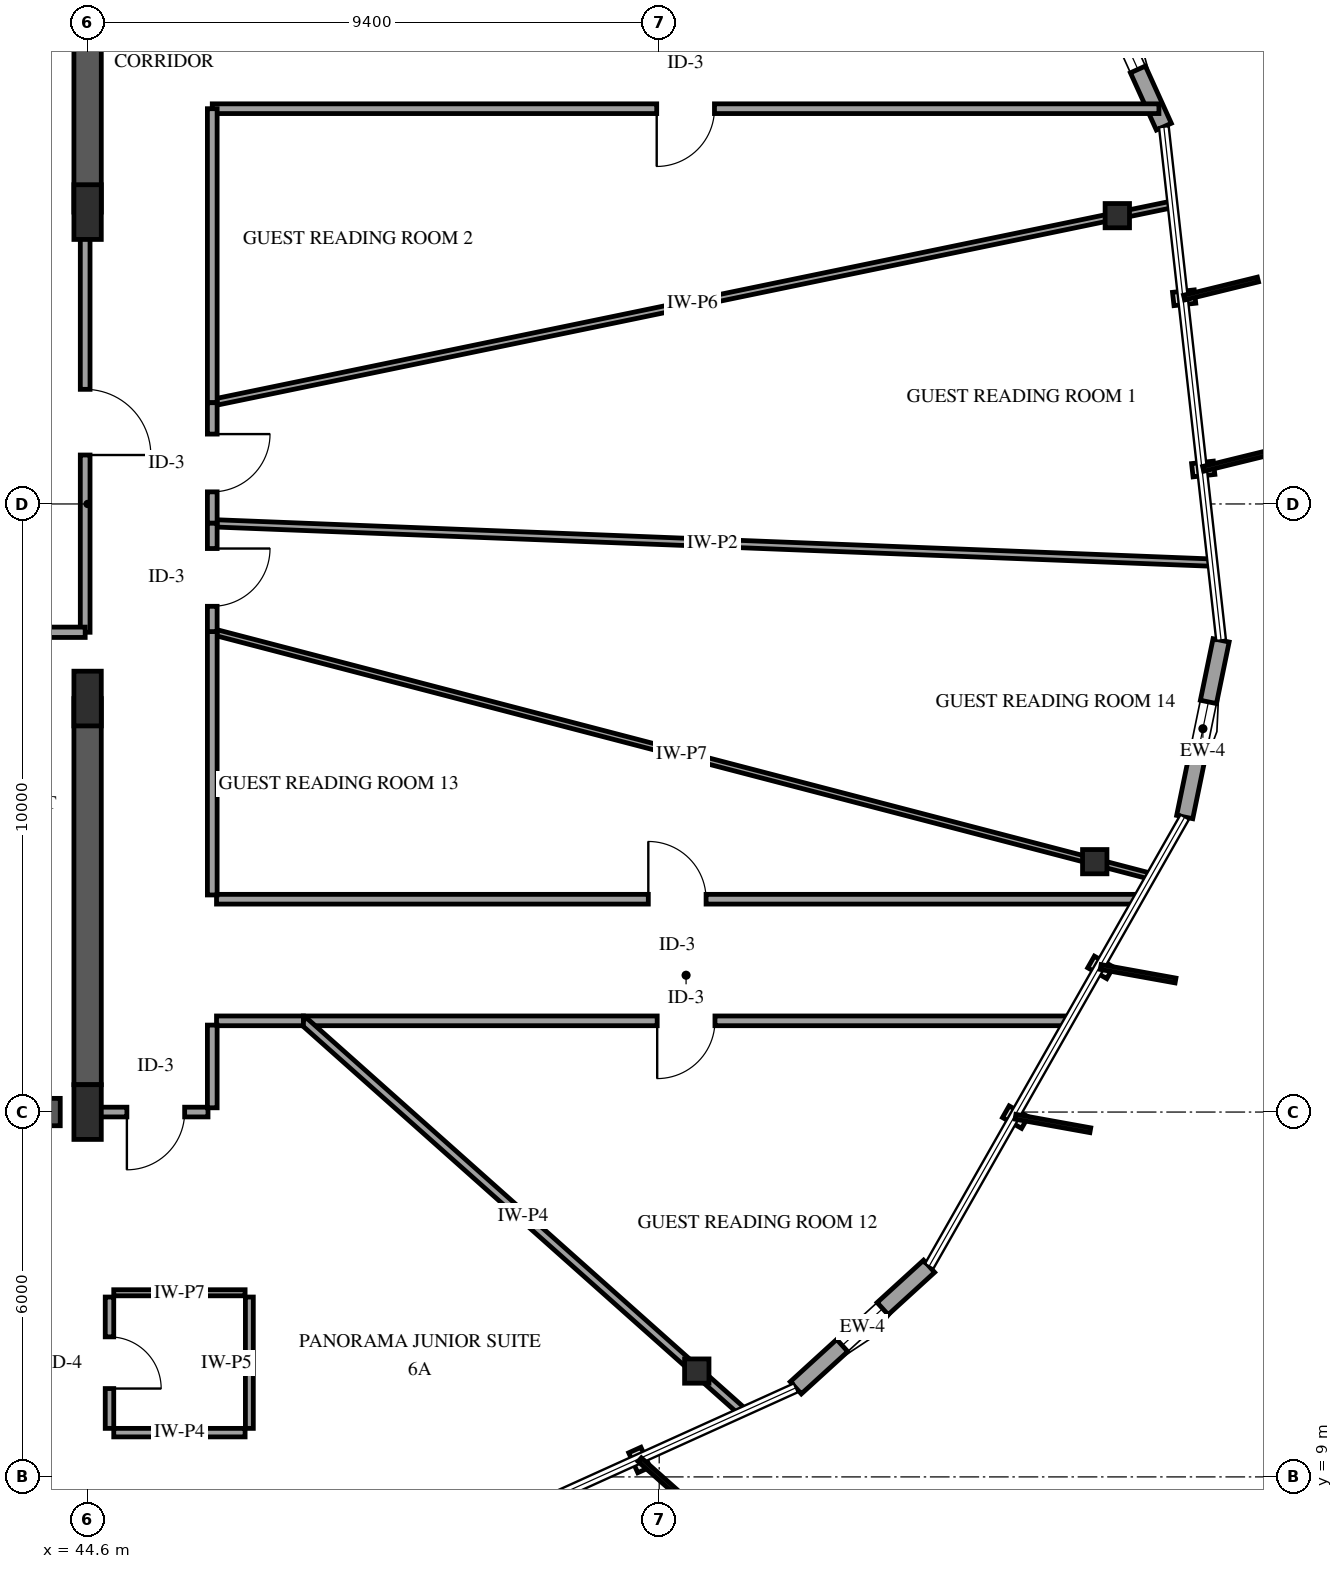
"""IFC4 building model, lengths in metres.
Left out: names, types, materials, properties, quantities, classifications, styles, units other than length and angle.
Written with IfcOpenShell. Run it as: python <this file> out.ifc"""

import sys

from ifc_helpers import new_model, si_unit, direction, frame, frame_2d, origin, origin_2d, place, context, subcontext, project, spatial, rectangle, i_section, extrude, element, fill, save


model = new_model("IFC4")
c1 = context("Model", 3, precision=1e-05, world=origin(), true_north=direction((0.0, 1.0)))
c2 = subcontext(c1, "Body", "Model", "MODEL_VIEW")
j1 = project(units=[si_unit("LENGTHUNIT", "METRE"), si_unit("PLANEANGLEUNIT", "RADIAN")], contexts=[c1])
p1 = place(None, origin())
s1 = spatial("IfcSite", under=j1, at=p1, CompositionType="ELEMENT")
p2 = place(p1, origin())
s2 = spatial("IfcBuilding", under=s1, at=p2, CompositionType="ELEMENT")
p3 = place(p2, frame((0.0, 0.0, 257.5)))
s3 = spatial("IfcBuildingStorey", under=s2, at=p3, CompositionType="ELEMENT", Elevation=257.5)
p4 = place(p3, frame((41.3, 15.0, 0.0), z_axis=(0.0, 0.0, 1.0), x_axis=(1.0, 0.0, 0.0)))
e1 = element("IfcWall", 1, at=p4, inside=s3, PredefinedType="SHEAR", context=c2, shape_type="SweptSolid", body=[
    extrude(rectangle(XDim=2.85, YDim=0.45, at=frame_2d((1.425, 0.0))), origin(), (0.0, 0.0, 1.0), 3.75),
])
p5 = place(p3, frame((44.6, 15.45, 0.0), z_axis=(0.0, 0.0, 1.0), x_axis=(0.0, 1.0, 0.0)))
e2 = element("IfcWall", 2, at=p5, inside=s3, PredefinedType="SHEAR", context=c2, shape_type="SweptSolid", body=[
    extrude(rectangle(XDim=6.35, YDim=0.45, at=frame_2d((3.175, 0.0))), origin(), (0.0, 0.0, 1.0), 3.75),
])
p6 = place(p3, frame((44.6, 29.8, 0.0), z_axis=(0.0, 0.0, 1.0), x_axis=(0.0, 1.0, 0.0)))
e3 = element("IfcWall", 3, at=p6, inside=s3, PredefinedType="SHEAR", context=c2, shape_type="SweptSolid", body=[
    extrude(rectangle(XDim=4.75, YDim=0.45, at=frame_2d((2.375, 0.0))), origin(), (0.0, 0.0, 1.0), 3.75),
])
for number, where, z_axis, x_axis in (
    (4, (44.6, 15.0, 0.0), (0.0, 0.0, 1.0), (1.0, 0.0, 0.0)),
    (5, (44.6, 21.8, 0.0), (0.0, 0.0, 1.0), (1.0, 0.0, 0.0)),
    (6, (44.6, 29.8, 0.0), (0.0, 0.0, 1.0), (1.0, 0.0, 0.0)),
):
    element("IfcColumn", number, at=place(p3, frame(where, z_axis=z_axis, x_axis=x_axis)), inside=s3, PredefinedType="PILASTER", context=c2, shape_type="SweptSolid", body=[
        extrude(rectangle(XDim=0.45, YDim=0.9, at=origin_2d()), origin(), (0.0, 0.0, 1.0), 3.75),
    ])
for number, where, z_axis, x_axis in (
    (7, (61.534, 29.741, 0.0), (0.0, 0.0, 1.0), (1.0, 0.0, 0.0)),
    (8, (54.618, 10.74, 0.0), (0.0, 0.0, 1.0), (1.0, 0.0, 0.0)),
    (9, (61.163, 19.117, 0.0), (0.0, 0.0, 1.0), (1.0, 0.0, 0.0)),
):
    element("IfcColumn", number, at=place(p3, frame(where, z_axis=z_axis, x_axis=x_axis)), inside=s3, PredefinedType="COLUMN", context=c2, shape_type="SweptSolid", body=[
        extrude(i_section(OverallWidth=0.401, OverallDepth=0.399, WebThickness=0.025, FlangeThickness=0.04, FilletRadius=0.038, at=origin_2d()), origin(), (0.0, 0.0, 1.0), 3.75),
    ])
p7 = place(p3, frame((56.246, 10.465, 0.0), z_axis=(0.0, 0.0, 1.0), x_axis=(0.73894499787, 0.673765753153, 0.0)))
e10 = element("IfcWall", 10, at=p7, inside=s3, PredefinedType="SOLIDWALL", context=c2, shape_type="SweptSolid", body=[
    extrude(rectangle(XDim=2.967, YDim=0.27, at=frame_2d((1.483, 0.0))), origin(), (0.0, 0.0, 1.0), 2.829),
])
p8 = place(p7, frame((1.033, 0.0, 0.75)))
e11 = element("IfcOpeningElement", 11, at=p8, cuts=e10, PredefinedType="OPENING", context=c2, shape_type="SweptSolid", body=[
    extrude(rectangle(XDim=0.9, YDim=1.5, at=frame_2d((0.45, 0.75))), frame((0.0, 0.145, 0.0), z_axis=(0.0, -1.0, 0.0), x_axis=(1.0, 0.0, 0.0)), (0.0, 0.0, 1.0), 0.29),
])
p9 = place(p3, frame((62.642, 19.851, 0.0), z_axis=(0.0, 0.0, 1.0), x_axis=(0.201715617992, 0.979444132893, 0.0)))
e12 = element("IfcWall", 12, at=p9, inside=s3, PredefinedType="SOLIDWALL", context=c2, shape_type="SweptSolid", body=[
    extrude(rectangle(XDim=2.967, YDim=0.27, at=frame_2d((1.483, 0.0))), origin(), (0.0, 0.0, 1.0), 2.829),
])
p10 = place(p9, frame((1.033, 0.0, 0.75)))
e13 = element("IfcOpeningElement", 13, at=p10, cuts=e12, PredefinedType="OPENING", context=c2, shape_type="SweptSolid", body=[
    extrude(rectangle(XDim=0.9, YDim=1.5, at=frame_2d((0.45, 0.75))), frame((0.0, 0.145, 0.0), z_axis=(0.0, -1.0, 0.0), x_axis=(1.0, 0.0, 0.0)), (0.0, 0.0, 1.0), 0.29),
])
p11 = place(p3, frame((62.299, 31.204, 0.0), z_axis=(0.0, 0.0, 1.0), x_axis=(-0.412481781571, 0.910965850003, 0.0)))
e14 = element("IfcWall", 14, at=p11, inside=s3, PredefinedType="SOLIDWALL", context=c2, shape_type="SweptSolid", body=[
    extrude(rectangle(XDim=2.967, YDim=0.27, at=frame_2d((1.483, 0.0))), origin(), (0.0, 0.0, 1.0), 2.829),
])
p12 = place(p11, frame((1.033, 0.0, 0.75)))
e15 = element("IfcOpeningElement", 15, at=p12, cuts=e14, PredefinedType="OPENING", context=c2, shape_type="SweptSolid", body=[
    extrude(rectangle(XDim=0.9, YDim=1.5, at=frame_2d((0.45, 0.75))), frame((0.0, 0.145, 0.0), z_axis=(0.0, -1.0, 0.0), x_axis=(1.0, 0.0, 0.0)), (0.0, 0.0, 1.0), 0.29),
])
p13 = place(p3, frame((63.098, 24.035, 0.0), z_axis=(0.0, 0.0, 1.0), x_axis=(-0.999224382553, 0.039378081603, 0.0)))
e16 = element("IfcWall", 16, at=p13, inside=s3, PredefinedType="PARTITIONING", context=c2, shape_type="SweptSolid", body=[
    extrude(rectangle(XDim=16.461, YDim=0.12, at=frame_2d((8.23, 0.0))), origin(), (0.0, 0.0, 1.0), 3.45),
])
p14 = place(p3, frame((46.65, 26.665, 0.0), z_axis=(0.0, 0.0, 1.0), x_axis=(0.979311663395, 0.202357767181, 0.0)))
e17 = element("IfcWall", 17, at=p14, inside=s3, PredefinedType="PARTITIONING", context=c2, shape_type="SweptSolid", body=[
    extrude(rectangle(XDim=16.125, YDim=0.11, at=frame_2d((8.062, 0.0))), origin(), (0.0, 0.0, 1.0), 2.745),
])
p15 = place(p3, frame((46.65, 22.901, 0.0), z_axis=(0.0, 0.0, 1.0), x_axis=(0.967650092585, -0.252296052923, 0.0)))
e18 = element("IfcWall", 18, at=p15, inside=s3, PredefinedType="PARTITIONING", context=c2, shape_type="SweptSolid", body=[
    extrude(rectangle(XDim=15.953, YDim=0.1, at=frame_2d((7.977, 0.0))), origin(), (0.0, 0.0, 1.0), 3.45),
])
p16 = place(p3, frame((62.218, 31.5, 0.0), z_axis=(0.0, 0.0, 1.0), x_axis=(-1.0, 0.0, 0.0)))
e19 = element("IfcWall", 19, at=p16, inside=s3, PredefinedType="PARTITIONING", context=c2, shape_type="SweptSolid", body=[
    extrude(rectangle(XDim=15.568, YDim=0.16, at=frame_2d((7.784, 0.0))), origin(), (0.0, 0.0, 1.0), 3.45),
])
p17 = place(p16, frame((7.309, 0.0, 0.0)))
e20 = element("IfcOpeningElement", 20, at=p17, cuts=e19, PredefinedType="OPENING", context=c2, shape_type="SweptSolid", body=[
    extrude(rectangle(XDim=0.95, YDim=2.15, at=frame_2d((0.475, 1.075))), frame((0.0, 0.09, 0.0), z_axis=(0.0, -1.0, 0.0), x_axis=(1.0, 0.0, 0.0)), (0.0, 0.0, 1.0), 0.18),
])
p18 = place(p3, frame((46.72, 18.5, 0.0), z_axis=(0.0, 0.0, 1.0), x_axis=(1.0, 0.0, 0.0)))
e21 = element("IfcWall", 21, at=p18, inside=s3, PredefinedType="PARTITIONING", context=c2, shape_type="SweptSolid", body=[
    extrude(rectangle(XDim=15.153, YDim=0.16, at=frame_2d((7.577, 0.0))), origin(), (0.0, 0.0, 1.0), 2.745),
])
p19 = place(p18, frame((7.101, 0.0, 0.0)))
e22 = element("IfcOpeningElement", 22, at=p19, cuts=e21, PredefinedType="OPENING", context=c2, shape_type="SweptSolid", body=[
    extrude(rectangle(XDim=0.95, YDim=2.15, at=frame_2d((0.475, 1.075))), frame((0.0, 0.09, 0.0), z_axis=(0.0, -1.0, 0.0), x_axis=(1.0, 0.0, 0.0)), (0.0, 0.0, 1.0), 0.18),
])
p20 = place(p3, frame((60.735, 16.5, 0.0), z_axis=(0.0, 0.0, 1.0), x_axis=(-1.0, 0.0, 0.0)))
e23 = element("IfcWall", 23, at=p20, inside=s3, PredefinedType="PARTITIONING", context=c2, shape_type="SweptSolid", body=[
    extrude(rectangle(XDim=12.586, YDim=0.16, at=frame_2d((6.293, 0.0))), origin(), (0.0, 0.0, 1.0), 3.45),
])
p21 = place(p20, frame((5.818, 0.0, 0.0)))
e24 = element("IfcOpeningElement", 24, at=p21, cuts=e23, PredefinedType="OPENING", context=c2, shape_type="SweptSolid", body=[
    extrude(rectangle(XDim=0.95, YDim=2.15, at=frame_2d((0.475, 1.075))), frame((0.0, 0.09, 0.0), z_axis=(0.0, -1.0, 0.0), x_axis=(1.0, 0.0, 0.0)), (0.0, 0.0, 1.0), 0.18),
])
p22 = place(p3, frame((48.149, 16.5, 0.0), z_axis=(0.0, 0.0, 1.0), x_axis=(0.746878427267, -0.664960611527, 0.0)))
e25 = element("IfcWall", 25, at=p22, inside=s3, PredefinedType="PARTITIONING", context=c2, shape_type="SweptSolid", body=[
    extrude(rectangle(XDim=9.671, YDim=0.14, at=frame_2d((4.835, 0.0))), origin(), (0.0, 0.0, 1.0), 2.828),
])
p23 = place(p3, frame((44.56, 29.8, 0.0), z_axis=(0.0, 0.0, 1.0), x_axis=(0.0, -1.0, 0.0)))
e26 = element("IfcWall", 26, at=p23, inside=s3, PredefinedType="PARTITIONING", context=c2, shape_type="SweptSolid", body=[
    extrude(rectangle(XDim=6.91, YDim=0.16, at=frame_2d((3.455, 0.0))), origin(), (0.0, 0.0, 1.0), 2.49),
])
p24 = place(p23, frame((2.915, 0.0, 0.0)))
e27 = element("IfcOpeningElement", 27, at=p24, cuts=e26, PredefinedType="OPENING", context=c2, shape_type="SweptSolid", body=[
    extrude(rectangle(XDim=1.08, YDim=2.15, at=frame_2d((0.54, 1.075))), frame((0.0, 0.09, 0.0), z_axis=(0.0, -1.0, 0.0), x_axis=(1.0, 0.0, 0.0)), (0.0, 0.0, 1.0), 0.18),
])
p25 = place(p3, frame((46.65, 31.5, 0.0), z_axis=(0.0, 0.0, 1.0), x_axis=(0.0, -1.0, 0.0)))
e28 = element("IfcWall", 28, at=p25, inside=s3, PredefinedType="PARTITIONING", context=c2, shape_type="SweptSolid", body=[
    extrude(rectangle(XDim=4.835, YDim=0.16, at=frame_2d((2.417, 0.0))), origin(), (0.0, 0.0, 1.0), 3.45),
])
p26 = place(p3, frame((46.65, 22.901, 0.0), z_axis=(0.0, 0.0, 1.0), x_axis=(0.0, -1.0, 0.0)))
e29 = element("IfcWall", 29, at=p26, inside=s3, PredefinedType="PARTITIONING", context=c2, shape_type="SweptSolid", body=[
    extrude(rectangle(XDim=4.331, YDim=0.16, at=frame_2d((2.166, 0.0))), origin(), (0.0, 0.0, 1.0), 3.45),
])
p27 = place(p3, frame((41.24, 22.89, 0.0), z_axis=(0.0, 0.0, 1.0), x_axis=(1.0, 0.0, 0.0)))
e30 = element("IfcWall", 30, at=p27, inside=s3, PredefinedType="PARTITIONING", context=c2, shape_type="SweptSolid", body=[
    extrude(rectangle(XDim=3.32, YDim=0.17, at=frame_2d((1.66, 0.0))), origin(), (0.0, 0.0, 1.0), 3.45),
])
p28 = place(p27, frame((1.12, 0.0, 0.0)))
e31 = element("IfcOpeningElement", 31, at=p28, cuts=e30, PredefinedType="OPENING", context=c2, shape_type="SweptSolid", body=[
    extrude(rectangle(XDim=1.08, YDim=2.15, at=frame_2d((0.54, 1.075))), frame((0.0, 0.095, 0.0), z_axis=(0.0, -1.0, 0.0), x_axis=(1.0, 0.0, 0.0)), (0.0, 0.0, 1.0), 0.19),
])
p29 = place(p3, frame((44.96, 11.958, 0.0), z_axis=(0.0, 0.0, 1.0), x_axis=(0.0, -1.0, 0.0)))
e32 = element("IfcWall", 32, at=p29, inside=s3, PredefinedType="PARTITIONING", context=c2, shape_type="SweptSolid", body=[
    extrude(rectangle(XDim=2.16, YDim=0.14, at=frame_2d((1.08, 0.0))), origin(), (0.0, 0.0, 1.0), 2.828),
])
p30 = place(p29, frame((0.655, 0.0, 0.0)))
e33 = element("IfcOpeningElement", 33, at=p30, cuts=e32, PredefinedType="OPENING", context=c2, shape_type="SweptSolid", body=[
    extrude(rectangle(XDim=0.85, YDim=2.1, at=frame_2d((0.425, 1.05))), frame((0.0, 0.08, 0.0), z_axis=(0.0, -1.0, 0.0), x_axis=(1.0, 0.0, 0.0)), (0.0, 0.0, 1.0), 0.16),
])
p31 = place(p3, frame((47.26, 9.798, 0.0), z_axis=(0.0, 0.0, 1.0), x_axis=(0.0, 1.0, 0.0)))
e34 = element("IfcWall", 34, at=p31, inside=s3, PredefinedType="PARTITIONING", context=c2, shape_type="SweptSolid", body=[
    extrude(rectangle(XDim=2.16, YDim=0.13, at=frame_2d((1.08, 0.0))), origin(), (0.0, 0.0, 1.0), 3.45),
])
p32 = place(p3, frame((47.19, 12.028, 0.0), z_axis=(0.0, 0.0, 1.0), x_axis=(-1.0, 0.0, 0.0)))
e35 = element("IfcWall", 35, at=p32, inside=s3, PredefinedType="PARTITIONING", context=c2, shape_type="SweptSolid", body=[
    extrude(rectangle(XDim=2.16, YDim=0.1, at=frame_2d((1.08, 0.0))), origin(), (0.0, 0.0, 1.0), 3.45),
])
p33 = place(p3, frame((45.03, 9.728, 0.0), z_axis=(0.0, 0.0, 1.0), x_axis=(1.0, 0.0, 0.0)))
e36 = element("IfcWall", 36, at=p33, inside=s3, PredefinedType="PARTITIONING", context=c2, shape_type="SweptSolid", body=[
    extrude(rectangle(XDim=2.16, YDim=0.14, at=frame_2d((1.08, 0.0))), origin(), (0.0, 0.0, 1.0), 3.45),
])
p34 = place(p3, frame((46.65, 26.665, 0.0), z_axis=(0.0, 0.0, 1.0), x_axis=(0.0, -1.0, 0.0)))
e37 = element("IfcWall", 37, at=p34, inside=s3, PredefinedType="PARTITIONING", context=c2, shape_type="SweptSolid", body=[
    extrude(rectangle(XDim=1.982, YDim=0.16, at=frame_2d((0.991, 0.0))), origin(), (0.0, 0.0, 1.0), 3.45),
])
p35 = place(p34, frame((0.516, 0.0, 0.0)))
e38 = element("IfcOpeningElement", 38, at=p35, cuts=e37, PredefinedType="OPENING", context=c2, shape_type="SweptSolid", body=[
    extrude(rectangle(XDim=0.95, YDim=2.15, at=frame_2d((0.475, 1.075))), frame((0.0, 0.09, 0.0), z_axis=(0.0, -1.0, 0.0), x_axis=(1.0, 0.0, 0.0)), (0.0, 0.0, 1.0), 0.18),
])
p36 = place(p3, frame((46.58, 15.0, 0.0), z_axis=(0.0, 0.0, 1.0), x_axis=(-1.0, 0.0, 0.0)))
e39 = element("IfcWall", 39, at=p36, inside=s3, PredefinedType="PARTITIONING", context=c2, shape_type="SweptSolid", body=[
    extrude(rectangle(XDim=1.91, YDim=0.16, at=frame_2d((0.955, 0.0))), origin(), (0.0, 0.0, 1.0), 3.45),
])
p37 = place(p36, frame((0.384, 0.0, 0.0)))
e40 = element("IfcOpeningElement", 40, at=p37, cuts=e39, PredefinedType="OPENING", context=c2, shape_type="SweptSolid", body=[
    extrude(rectangle(XDim=0.95, YDim=2.15, at=frame_2d((0.475, 1.075))), frame((0.0, 0.09, 0.0), z_axis=(0.0, -1.0, 0.0), x_axis=(1.0, 0.0, 0.0)), (0.0, 0.0, 1.0), 0.18),
])
p38 = place(p3, frame((46.65, 24.683, 0.0), z_axis=(0.0, 0.0, 1.0), x_axis=(0.0, -1.0, 0.0)))
e41 = element("IfcWall", 41, at=p38, inside=s3, PredefinedType="PARTITIONING", context=c2, shape_type="SweptSolid", body=[
    extrude(rectangle(XDim=1.782, YDim=0.16, at=frame_2d((0.891, 0.0))), origin(), (0.0, 0.0, 1.0), 3.45),
])
p39 = place(p38, frame((0.416, 0.0, 0.0)))
e42 = element("IfcOpeningElement", 42, at=p39, cuts=e41, PredefinedType="OPENING", context=c2, shape_type="SweptSolid", body=[
    extrude(rectangle(XDim=0.95, YDim=2.15, at=frame_2d((0.475, 1.075))), frame((0.0, 0.09, 0.0), z_axis=(0.0, -1.0, 0.0), x_axis=(1.0, 0.0, 0.0)), (0.0, 0.0, 1.0), 0.18),
])
p40 = place(p3, frame((48.149, 16.5, 0.0), z_axis=(0.0, 0.0, 1.0), x_axis=(-1.0, 0.0, 0.0)))
e43 = element("IfcWall", 43, at=p40, inside=s3, PredefinedType="PARTITIONING", context=c2, shape_type="SweptSolid", body=[
    extrude(rectangle(XDim=1.429, YDim=0.16, at=frame_2d((0.714, 0.0))), origin(), (0.0, 0.0, 1.0), 3.45),
])
p41 = place(p3, frame((46.65, 16.43, 0.0), z_axis=(0.0, 0.0, 1.0), x_axis=(0.0, -1.0, 0.0)))
e44 = element("IfcWall", 44, at=p41, inside=s3, PredefinedType="PARTITIONING", context=c2, shape_type="SweptSolid", body=[
    extrude(rectangle(XDim=1.36, YDim=0.16, at=frame_2d((0.68, 0.0))), origin(), (0.0, 0.0, 1.0), 3.45),
])
p42 = place(p8, origin())
e45 = element("IfcWindow", 45, at=p42, inside=s3, PartitioningType="SINGLE_PANEL", PredefinedType="WINDOW", context=c2, shape_type="SweptSolid", body=[
    extrude(rectangle(XDim=0.9, YDim=1.5, at=frame_2d((0.45, 0.75))), frame((0.0, 0.03, 0.0), z_axis=(0.0, -1.0, 0.0), x_axis=(1.0, 0.0, 0.0)), (0.0, 0.0, 1.0), 0.06),
])
fill(e11, e45)
p43 = place(p10, origin())
e46 = element("IfcWindow", 46, at=p43, inside=s3, PartitioningType="SINGLE_PANEL", PredefinedType="WINDOW", context=c2, shape_type="SweptSolid", body=[
    extrude(rectangle(XDim=0.9, YDim=1.5, at=frame_2d((0.45, 0.75))), frame((0.0, 0.03, 0.0), z_axis=(0.0, -1.0, 0.0), x_axis=(1.0, 0.0, 0.0)), (0.0, 0.0, 1.0), 0.06),
])
fill(e13, e46)
p44 = place(p12, origin())
e47 = element("IfcWindow", 47, at=p44, inside=s3, PartitioningType="SINGLE_PANEL", PredefinedType="WINDOW", context=c2, shape_type="SweptSolid", body=[
    extrude(rectangle(XDim=0.9, YDim=1.5, at=frame_2d((0.45, 0.75))), frame((0.0, 0.03, 0.0), z_axis=(0.0, -1.0, 0.0), x_axis=(1.0, 0.0, 0.0)), (0.0, 0.0, 1.0), 0.06),
])
fill(e15, e47)
p45 = place(p17, origin())
e48 = element("IfcDoor", 48, at=p45, inside=s3, OperationType="SINGLE_SWING_RIGHT", PredefinedType="DOOR", context=c2, shape_type="SweptSolid", body=[
    extrude(rectangle(XDim=0.95, YDim=2.15, at=frame_2d((0.475, 1.075))), frame((0.0, 0.025, 0.0), z_axis=(0.0, -1.0, 0.0), x_axis=(1.0, 0.0, 0.0)), (0.0, 0.0, 1.0), 0.05),
])
fill(e20, e48)
p46 = place(p19, origin())
e49 = element("IfcDoor", 49, at=p46, inside=s3, OperationType="SINGLE_SWING_LEFT", PredefinedType="DOOR", context=c2, shape_type="SweptSolid", body=[
    extrude(rectangle(XDim=0.95, YDim=2.15, at=frame_2d((0.475, 1.075))), frame((0.0, 0.025, 0.0), z_axis=(0.0, -1.0, 0.0), x_axis=(1.0, 0.0, 0.0)), (0.0, 0.0, 1.0), 0.05),
])
fill(e22, e49)
p47 = place(p21, origin())
e50 = element("IfcDoor", 50, at=p47, inside=s3, OperationType="SINGLE_SWING_RIGHT", PredefinedType="DOOR", context=c2, shape_type="SweptSolid", body=[
    extrude(rectangle(XDim=0.95, YDim=2.15, at=frame_2d((0.475, 1.075))), frame((0.0, 0.025, 0.0), z_axis=(0.0, -1.0, 0.0), x_axis=(1.0, 0.0, 0.0)), (0.0, 0.0, 1.0), 0.05),
])
fill(e24, e50)
p48 = place(p24, origin())
e51 = element("IfcDoor", 51, at=p48, inside=s3, OperationType="SINGLE_SWING_RIGHT", PredefinedType="DOOR", context=c2, shape_type="SweptSolid", body=[
    extrude(rectangle(XDim=1.08, YDim=2.15, at=frame_2d((0.54, 1.075))), frame((0.0, 0.025, 0.0), z_axis=(0.0, -1.0, 0.0), x_axis=(1.0, 0.0, 0.0)), (0.0, 0.0, 1.0), 0.05),
])
fill(e27, e51)
p49 = place(p30, origin())
e52 = element("IfcDoor", 52, at=p49, inside=s3, OperationType="SINGLE_SWING_RIGHT", PredefinedType="DOOR", context=c2, shape_type="SweptSolid", body=[
    extrude(rectangle(XDim=0.85, YDim=2.1, at=frame_2d((0.425, 1.05))), frame((0.0, 0.025, 0.0), z_axis=(0.0, -1.0, 0.0), x_axis=(1.0, 0.0, 0.0)), (0.0, 0.0, 1.0), 0.05),
])
fill(e33, e52)
p50 = place(p35, origin())
e53 = element("IfcDoor", 53, at=p50, inside=s3, OperationType="SINGLE_SWING_LEFT", PredefinedType="DOOR", context=c2, shape_type="SweptSolid", body=[
    extrude(rectangle(XDim=0.95, YDim=2.15, at=frame_2d((0.475, 1.075))), frame((0.0, 0.025, 0.0), z_axis=(0.0, -1.0, 0.0), x_axis=(1.0, 0.0, 0.0)), (0.0, 0.0, 1.0), 0.05),
])
fill(e38, e53)
p51 = place(p37, origin())
e54 = element("IfcDoor", 54, at=p51, inside=s3, OperationType="SINGLE_SWING_RIGHT", PredefinedType="DOOR", context=c2, shape_type="SweptSolid", body=[
    extrude(rectangle(XDim=0.95, YDim=2.15, at=frame_2d((0.475, 1.075))), frame((0.0, 0.025, 0.0), z_axis=(0.0, -1.0, 0.0), x_axis=(1.0, 0.0, 0.0)), (0.0, 0.0, 1.0), 0.05),
])
fill(e40, e54)
p52 = place(p39, origin())
e55 = element("IfcDoor", 55, at=p52, inside=s3, OperationType="SINGLE_SWING_LEFT", PredefinedType="DOOR", context=c2, shape_type="SweptSolid", body=[
    extrude(rectangle(XDim=0.95, YDim=2.15, at=frame_2d((0.475, 1.075))), frame((0.0, 0.025, 0.0), z_axis=(0.0, -1.0, 0.0), x_axis=(1.0, 0.0, 0.0)), (0.0, 0.0, 1.0), 0.05),
])
fill(e42, e55)
save(model, sys.argv[1])
